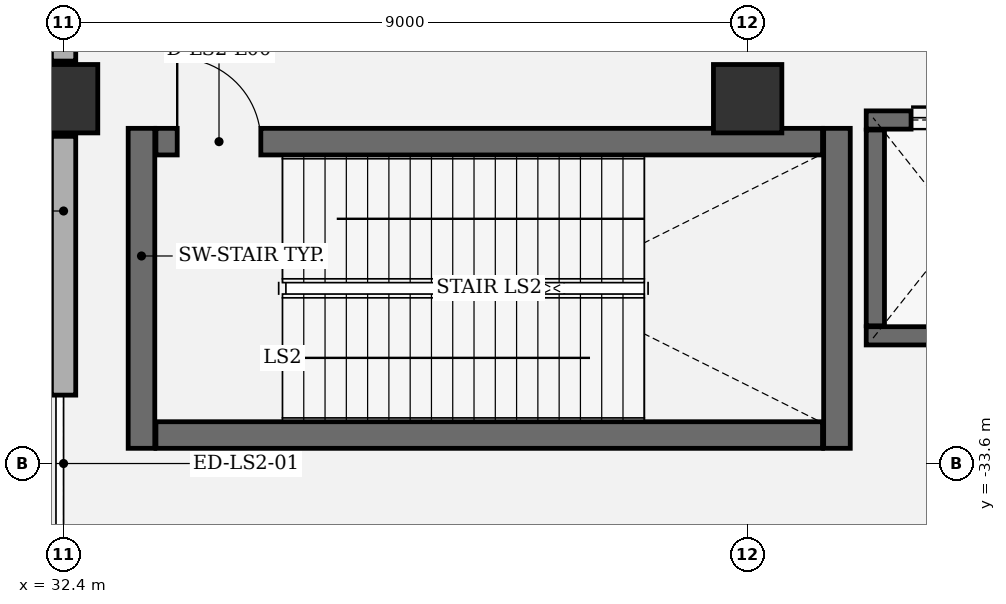
"""IFC4 building model, lengths in metres.
Left out: names, types, materials, properties, quantities, classifications, styles, units other than length and angle.
Written with IfcOpenShell. Run it as: python <this file> out.ifc"""

import sys

from ifc_helpers import new_model, si_unit, direction, frame, frame_2d, origin, origin_2d, place, context, subcontext, project, spatial, rectangle, extrude, element, fill, save


model = new_model("IFC4")
c1 = context("Model", 3, precision=1e-05, world=origin(), true_north=direction((0.0, 1.0)))
c2 = subcontext(c1, "Body", "Model", "MODEL_VIEW")
j1 = project(units=[si_unit("LENGTHUNIT", "METRE"), si_unit("PLANEANGLEUNIT", "RADIAN")], contexts=[c1])
p1 = place(None, origin())
s1 = spatial("IfcSite", under=j1, at=p1, CompositionType="ELEMENT")
p2 = place(p1, origin())
s2 = spatial("IfcBuilding", under=s1, at=p2, CompositionType="ELEMENT")
p3 = place(p2, origin())
s3 = spatial("IfcBuildingStorey", under=s2, at=p3, CompositionType="ELEMENT", Elevation=0.0)
for number, where, z_axis, x_axis in (
    (1, (32.4, -28.8, 0.0), (0.0, 0.0, 1.0), (1.0, 0.0, 0.0)),
    (2, (41.4, -28.8, 0.0), (0.0, 0.0, 1.0), (1.0, 0.0, 0.0)),
):
    element("IfcColumn", number, at=place(p3, frame(where, z_axis=z_axis, x_axis=x_axis)), inside=s3, PredefinedType="COLUMN", context=c2, shape_type="SweptSolid", body=[
        extrude(rectangle(XDim=0.9, YDim=0.9, at=origin_2d()), origin(), (0.0, 0.0, 1.0), 6.6),
    ])
p4 = place(p3, frame((32.4, -37.905, 0.0), z_axis=(0.0, 0.0, 1.0), x_axis=(0.0, 1.0, 0.0)))
e3 = element("IfcWall", 3, at=p4, inside=s3, PredefinedType="SOLIDWALL", context=c2, shape_type="SweptSolid", body=[
    extrude(rectangle(XDim=8.61, YDim=0.32, at=frame_2d((4.305, 0.0))), origin(), (0.0, 0.0, 1.0), 5.537),
])
p5 = place(p4, frame((3.405, 0.0, 0.0)))
e4 = element("IfcOpeningElement", 4, at=p5, cuts=e3, PredefinedType="OPENING", context=c2, shape_type="SweptSolid", body=[
    extrude(rectangle(XDim=1.8, YDim=2.35, at=frame_2d((0.9, 1.175))), frame((0.0, 0.17, 0.0), z_axis=(0.0, -1.0, 0.0), x_axis=(1.0, 0.0, 0.0)), (0.0, 0.0, 1.0), 0.34),
])
p6 = place(p3, frame((32.4, -28.305, 0.0), z_axis=(0.0, 0.0, 1.0), x_axis=(0.0, 1.0, 0.0)))
e5 = element("IfcWall", 5, at=p6, inside=s3, PredefinedType="SOLIDWALL", context=c2, shape_type="SweptSolid", body=[
    extrude(rectangle(XDim=8.61, YDim=0.32, at=frame_2d((4.305, 0.0))), origin(), (0.0, 0.0, 1.0), 5.537),
])
for number, where, z_axis, x_axis in (
    (6, (33.425, -29.19, 0.0), (0.0, 0.0, 1.0), (0.0, -1.0, 0.0)),
    (7, (42.575, -33.4, 0.0), (0.0, 0.0, 1.0), (0.0, 1.0, 0.0)),
):
    element("IfcWall", number, at=place(p3, frame(where, z_axis=z_axis, x_axis=x_axis)), inside=s3, PredefinedType="SHEAR", context=c2, shape_type="SweptSolid", body=[
        extrude(rectangle(XDim=4.21, YDim=0.35, at=frame_2d((2.105, 0.0))), origin(), (0.0, 0.0, 1.0), 6.595),
    ])
p7 = place(p3, frame((33.615, -33.225, 0.0), z_axis=(0.0, 0.0, 1.0), x_axis=(1.0, 0.0, 0.0)))
e8 = element("IfcWall", 8, at=p7, inside=s3, PredefinedType="SHEAR", context=c2, shape_type="SweptSolid", body=[
    extrude(rectangle(XDim=8.77, YDim=0.35, at=frame_2d((4.385, 0.0))), origin(), (0.0, 0.0, 1.0), 6.595),
])
p8 = place(p3, frame((33.615, -29.365, 0.0), z_axis=(0.0, 0.0, 1.0), x_axis=(1.0, 0.0, 0.0)))
e9 = element("IfcWall", 9, at=p8, inside=s3, PredefinedType="SHEAR", context=c2, shape_type="SweptSolid", body=[
    extrude(rectangle(XDim=8.77, YDim=0.35, at=frame_2d((4.385, 0.0))), origin(), (0.0, 0.0, 1.0), 6.595),
])
p9 = place(p8, frame((0.28, 0.0, 0.0)))
e10 = element("IfcOpeningElement", 10, at=p9, cuts=e9, PredefinedType="OPENING", context=c2, shape_type="SweptSolid", body=[
    extrude(rectangle(XDim=1.1, YDim=2.2, at=frame_2d((0.55, 1.1))), frame((0.0, 0.185, 0.0), z_axis=(0.0, -1.0, 0.0), x_axis=(1.0, 0.0, 0.0)), (0.0, 0.0, 1.0), 0.37),
])
p10 = place(p3, frame((45.44, -31.92, 0.0), z_axis=(0.0, 0.0, 1.0), x_axis=(-1.0, 0.0, 0.0)))
e11 = element("IfcWall", 11, at=p10, inside=s3, PredefinedType="SHEAR", context=c2, shape_type="SweptSolid", body=[
    extrude(rectangle(XDim=2.48, YDim=0.24, at=frame_2d((1.24, 0.0))), origin(), (0.0, 0.0, 1.0), 6.34),
])
p11 = place(p3, frame((42.96, -29.08, 0.0), z_axis=(0.0, 0.0, 1.0), x_axis=(1.0, 0.0, 0.0)))
e12 = element("IfcWall", 12, at=p11, inside=s3, PredefinedType="SHEAR", context=c2, shape_type="SweptSolid", body=[
    extrude(rectangle(XDim=2.48, YDim=0.24, at=frame_2d((1.24, 0.0))), origin(), (0.0, 0.0, 1.0), 6.34),
])
p12 = place(p11, frame((0.59, 0.0, 0.0)))
e13 = element("IfcOpeningElement", 13, at=p12, cuts=e12, PredefinedType="OPENING", context=c2, shape_type="SweptSolid", body=[
    extrude(rectangle(XDim=1.3, YDim=2.3, at=frame_2d((0.65, 1.15))), frame((0.0, 0.13, 0.0), z_axis=(0.0, -1.0, 0.0), x_axis=(1.0, 0.0, 0.0)), (0.0, 0.0, 1.0), 0.26),
])
p13 = place(p3, frame((43.08, -31.788, 0.0), z_axis=(0.0, 0.0, 1.0), x_axis=(0.0, 1.0, 0.0)))
e14 = element("IfcWall", 14, at=p13, inside=s3, PredefinedType="SHEAR", context=c2, shape_type="SweptSolid", body=[
    extrude(rectangle(XDim=2.576, YDim=0.24, at=frame_2d((1.288, 0.0))), origin(), (0.0, 0.0, 1.0), 6.34),
])
p14 = place(p5, origin())
e15 = element("IfcDoor", 15, at=p14, inside=s3, OperationType="SINGLE_SWING_RIGHT", PredefinedType="DOOR", context=c2, shape_type="SweptSolid", body=[
    extrude(rectangle(XDim=1.8, YDim=2.35, at=frame_2d((0.9, 1.175))), frame((0.0, 0.025, 0.0), z_axis=(0.0, -1.0, 0.0), x_axis=(1.0, 0.0, 0.0)), (0.0, 0.0, 1.0), 0.05),
])
fill(e4, e15)
p15 = place(p9, origin())
e16 = element("IfcDoor", 16, at=p15, inside=s3, OperationType="SINGLE_SWING_LEFT", PredefinedType="DOOR", context=c2, shape_type="SweptSolid", body=[
    extrude(rectangle(XDim=1.1, YDim=2.2, at=frame_2d((0.55, 1.1))), frame((0.0, 0.025, 0.0), z_axis=(0.0, -1.0, 0.0), x_axis=(1.0, 0.0, 0.0)), (0.0, 0.0, 1.0), 0.05),
])
fill(e10, e16)
p16 = place(p12, origin())
e17 = element("IfcDoor", 17, at=p16, inside=s3, OperationType="DOUBLE_DOOR_SLIDING", PredefinedType="DOOR", context=c2, shape_type="SweptSolid", body=[
    extrude(rectangle(XDim=1.3, YDim=2.3, at=frame_2d((0.65, 1.15))), frame((0.0, 0.025, 0.0), z_axis=(0.0, -1.0, 0.0), x_axis=(1.0, 0.0, 0.0)), (0.0, 0.0, 1.0), 0.05),
])
fill(e13, e17)
save(model, sys.argv[1])
